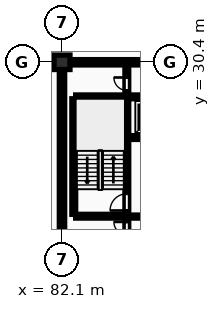
"""IFC4 building model, lengths in metres.
Left out: names, types, materials, properties, quantities, classifications, styles, units other than length and angle.
Written with IfcOpenShell. Run it as: python <this file> out.ifc"""

import sys

from ifc_helpers import new_model, si_unit, direction, frame, frame_2d, origin, origin_2d, place, context, subcontext, project, spatial, rectangle, extrude, element, fill, save


model = new_model("IFC4")
c1 = context("Model", 3, precision=1e-05, world=origin(), true_north=direction((0.0, 1.0)))
c2 = subcontext(c1, "Body", "Model", "MODEL_VIEW")
j1 = project(units=[si_unit("LENGTHUNIT", "METRE"), si_unit("PLANEANGLEUNIT", "RADIAN")], contexts=[c1])
p1 = place(None, origin())
s1 = spatial("IfcSite", under=j1, at=p1, CompositionType="ELEMENT")
p2 = place(p1, origin())
s2 = spatial("IfcBuilding", under=s1, at=p2, CompositionType="ELEMENT")
p3 = place(p2, frame((0.0, 0.0, -10.8)))
s3 = spatial("IfcBuildingStorey", under=s2, at=p3, CompositionType="ELEMENT", Elevation=-10.8)
p4 = place(p3, frame((82.1, 30.4, -0.45), z_axis=(0.0, 0.0, 1.0), x_axis=(1.0, 0.0, 0.0)))
e1 = element("IfcColumn", 1, at=p4, inside=s3, PredefinedType="COLUMN", context=c2, shape_type="SweptSolid", body=[
    extrude(rectangle(XDim=1.05, YDim=0.95, at=origin_2d()), origin(), (0.0, 0.0, 1.0), 4.05),
])
p5 = place(p3, frame((81.925, 30.4, 0.0), z_axis=(0.0, 0.0, 1.0), x_axis=(1.0, 0.0, 0.0)))
e2 = element("IfcWall", 2, at=p5, inside=s3, PredefinedType="SHEAR", context=c2, shape_type="SweptSolid", body=[
    extrude(rectangle(XDim=36.265, YDim=0.35, at=frame_2d((18.132, 0.0))), origin(), (0.0, 0.0, 1.0), 3.6),
])
p6 = place(p3, frame((82.1, 18.575, 0.0), z_axis=(0.0, 0.0, 1.0), x_axis=(0.0, 1.0, 0.0)))
e3 = element("IfcWall", 3, at=p6, inside=s3, PredefinedType="SHEAR", context=c2, shape_type="SweptSolid", body=[
    extrude(rectangle(XDim=11.65, YDim=0.35, at=frame_2d((5.825, 0.0))), origin(), (0.0, 0.0, 1.0), 3.6),
])
p7 = place(p3, frame((82.875, 20.4, 0.0), z_axis=(0.0, 0.0, 1.0), x_axis=(0.0, 1.0, 0.0)))
e4 = element("IfcWall", 4, at=p7, inside=s3, PredefinedType="SHEAR", context=c2, shape_type="SweptSolid", body=[
    extrude(rectangle(XDim=7.6, YDim=0.25, at=frame_2d((3.8, 0.0))), origin(), (0.0, 0.0, 1.0), 3.6),
])
p8 = place(p3, frame((86.365, 18.6, 0.0), z_axis=(0.0, 0.0, 1.0), x_axis=(0.0, 1.0, 0.0)))
e5 = element("IfcWall", 5, at=p8, inside=s3, PredefinedType="SHEAR", context=c2, shape_type="SweptSolid", body=[
    extrude(rectangle(XDim=11.6, YDim=0.25, at=frame_2d((5.8, 0.0))), origin(), (0.0, 0.0, 1.0), 3.6),
])
p9 = place(p8, frame((0.45, 0.0, 0.0)))
e6 = element("IfcOpeningElement", 6, at=p9, cuts=e5, PredefinedType="OPENING", context=c2, shape_type="SweptSolid", body=[
    extrude(rectangle(XDim=0.85, YDim=2.05, at=frame_2d((0.425, 1.025))), frame((0.0, 0.135, 0.0), z_axis=(0.0, -1.0, 0.0), x_axis=(1.0, 0.0, 0.0)), (0.0, 0.0, 1.0), 0.27),
])
p10 = place(p8, frame((2.05, 0.0, 0.0)))
e7 = element("IfcOpeningElement", 7, at=p10, cuts=e5, PredefinedType="OPENING", context=c2, shape_type="SweptSolid", body=[
    extrude(rectangle(XDim=1.1, YDim=2.1, at=frame_2d((0.55, 1.05))), frame((0.0, 0.135, 0.0), z_axis=(0.0, -1.0, 0.0), x_axis=(1.0, 0.0, 0.0)), (0.0, 0.0, 1.0), 0.27),
])
p11 = place(p8, frame((9.95, 0.0, 0.0)))
e8 = element("IfcOpeningElement", 8, at=p11, cuts=e5, PredefinedType="OPENING", context=c2, shape_type="SweptSolid", body=[
    extrude(rectangle(XDim=0.85, YDim=2.05, at=frame_2d((0.425, 1.025))), frame((0.0, 0.135, 0.0), z_axis=(0.0, -1.0, 0.0), x_axis=(1.0, 0.0, 0.0)), (0.0, 0.0, 1.0), 0.27),
])
p12 = place(p3, frame((83.0, 20.275, 0.0), z_axis=(0.0, 0.0, 1.0), x_axis=(1.0, 0.0, 0.0)))
e9 = element("IfcWall", 9, at=p12, inside=s3, PredefinedType="SHEAR", context=c2, shape_type="SweptSolid", body=[
    extrude(rectangle(XDim=3.24, YDim=0.25, at=frame_2d((1.62, 0.0))), origin(), (0.0, 0.0, 1.0), 3.6),
])
p13 = place(p3, frame((83.0, 28.125, 0.0), z_axis=(0.0, 0.0, 1.0), x_axis=(1.0, 0.0, 0.0)))
e10 = element("IfcWall", 10, at=p13, inside=s3, PredefinedType="SHEAR", context=c2, shape_type="SweptSolid", body=[
    extrude(rectangle(XDim=7.82, YDim=0.25, at=frame_2d((3.91, 0.0))), origin(), (0.0, 0.0, 1.0), 3.6),
])
p14 = place(p3, frame((86.5, 25.45, 0.0), z_axis=(0.0, 0.0, 1.0), x_axis=(1.0, 0.0, 0.0)))
e11 = element("IfcWall", 11, at=p14, inside=s3, PredefinedType="SHEAR", context=c2, shape_type="SweptSolid", body=[
    extrude(rectangle(XDim=4.32, YDim=0.25, at=frame_2d((2.16, 0.0))), origin(), (0.0, 0.0, 1.0), 3.6),
])
p15 = place(p14, frame((1.14, 0.0, 0.0)))
e12 = element("IfcOpeningElement", 12, at=p15, cuts=e11, PredefinedType="OPENING", context=c2, shape_type="SweptSolid", body=[
    extrude(rectangle(XDim=1.12, YDim=2.12, at=frame_2d((0.56, 1.06))), frame((0.0, 0.135, 0.0), z_axis=(0.0, -1.0, 0.0), x_axis=(1.0, 0.0, 0.0)), (0.0, 0.0, 1.0), 0.27),
])
p16 = place(p14, frame((3.25, 0.0, 0.0)))
e13 = element("IfcOpeningElement", 13, at=p16, cuts=e11, PredefinedType="OPENING", context=c2, shape_type="SweptSolid", body=[
    extrude(rectangle(XDim=0.85, YDim=2.05, at=frame_2d((0.425, 1.025))), frame((0.0, 0.135, 0.0), z_axis=(0.0, -1.0, 0.0), x_axis=(1.0, 0.0, 0.0)), (0.0, 0.0, 1.0), 0.27),
])
p17 = place(p3, frame((86.5, 20.25, 0.0), z_axis=(0.0, 0.0, 1.0), x_axis=(1.0, 0.0, 0.0)))
e14 = element("IfcWall", 14, at=p17, inside=s3, PredefinedType="PARTITIONING", context=c2, shape_type="SweptSolid", body=[
    extrude(rectangle(XDim=4.32, YDim=0.2, at=frame_2d((2.16, 0.0))), origin(), (0.0, 0.0, 1.0), 3.3),
])
p18 = place(p17, frame((1.4, 0.0, 0.0)))
e15 = element("IfcOpeningElement", 15, at=p18, cuts=e14, PredefinedType="OPENING", context=c2, shape_type="SweptSolid", body=[
    extrude(rectangle(XDim=1.1, YDim=2.1, at=frame_2d((0.55, 1.05))), frame((0.0, 0.11, 0.0), z_axis=(0.0, -1.0, 0.0), x_axis=(1.0, 0.0, 0.0)), (0.0, 0.0, 1.0), 0.22),
])
p19 = place(p9, origin())
e16 = element("IfcDoor", 16, at=p19, inside=s3, OperationType="SINGLE_SWING_RIGHT", PredefinedType="DOOR", context=c2, shape_type="SweptSolid", body=[
    extrude(rectangle(XDim=0.85, YDim=2.05, at=frame_2d((0.425, 1.025))), frame((0.0, 0.025, 0.0), z_axis=(0.0, -1.0, 0.0), x_axis=(1.0, 0.0, 0.0)), (0.0, 0.0, 1.0), 0.05),
])
fill(e6, e16)
p20 = place(p10, origin())
e17 = element("IfcDoor", 17, at=p20, inside=s3, OperationType="SINGLE_SWING_LEFT", PredefinedType="DOOR", context=c2, shape_type="SweptSolid", body=[
    extrude(rectangle(XDim=1.1, YDim=2.1, at=frame_2d((0.55, 1.05))), frame((0.0, 0.025, 0.0), z_axis=(0.0, -1.0, 0.0), x_axis=(1.0, 0.0, 0.0)), (0.0, 0.0, 1.0), 0.05),
])
fill(e7, e17)
p21 = place(p11, origin())
e18 = element("IfcDoor", 18, at=p21, inside=s3, OperationType="SINGLE_SWING_RIGHT", PredefinedType="DOOR", context=c2, shape_type="SweptSolid", body=[
    extrude(rectangle(XDim=0.85, YDim=2.05, at=frame_2d((0.425, 1.025))), frame((0.0, 0.025, 0.0), z_axis=(0.0, -1.0, 0.0), x_axis=(1.0, 0.0, 0.0)), (0.0, 0.0, 1.0), 0.05),
])
fill(e8, e18)
save(model, sys.argv[1])
